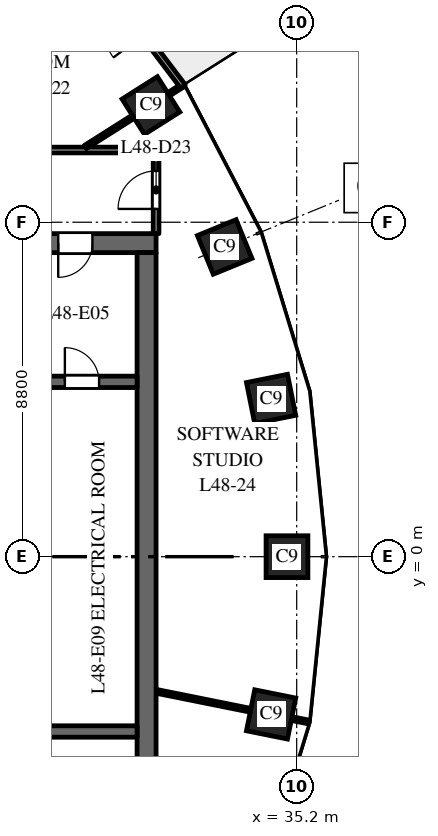
"""IFC4 building model, lengths in metres.
Left out: names, types, materials, properties, quantities, classifications, styles, units other than length and angle.
Written with IfcOpenShell. Run it as: python <this file> out.ifc"""

import sys

from ifc_helpers import new_model, si_unit, direction, frame, frame_2d, origin, origin_2d, place, context, subcontext, project, spatial, rectangle, extrude, element, fill, save


model = new_model("IFC4")
c1 = context("Model", 3, precision=1e-05, world=origin(), true_north=direction((0.0, 1.0)))
c2 = subcontext(c1, "Body", "Model", "MODEL_VIEW")
j1 = project(units=[si_unit("LENGTHUNIT", "METRE"), si_unit("PLANEANGLEUNIT", "RADIAN")], contexts=[c1])
p1 = place(None, origin())
s1 = spatial("IfcSite", under=j1, at=p1, CompositionType="ELEMENT")
p2 = place(p1, origin())
s2 = spatial("IfcBuilding", under=s1, at=p2, CompositionType="ELEMENT")
p3 = place(p2, frame((0.0, 0.0, 233.5)))
s3 = spatial("IfcBuildingStorey", under=s2, at=p3, CompositionType="ELEMENT", Elevation=233.5)
for number, where, z_axis, x_axis in (
    (1, (34.945, 0.0, 0.0), (0.0, 0.0, 1.0), (0.0, 1.0, 0.0)),
    (2, (34.527, 4.151, 0.0), (0.0, 0.0, 1.0), (-0.197, 0.98, 0.0)),
    (3, (33.305, 8.149, 0.0), (0.0, 0.0, 1.0), (-0.379, 0.925, 0.0)),
    (4, (31.365, 11.871, 0.0), (0.0, 0.0, 1.0), (-0.535, 0.845, 0.0)),
    (5, (34.527, -4.151, 0.0), (0.0, 0.0, 1.0), (0.197, 0.98, 0.0)),
):
    element("IfcColumn", number, at=place(p3, frame(where, z_axis=z_axis, x_axis=x_axis)), inside=s3, PredefinedType="COLUMN", context=c2, shape_type="SweptSolid", body=[
        extrude(rectangle(XDim=1.1, YDim=1.1, at=origin_2d()), origin(), (0.0, 0.0, 1.0), 4.0),
    ])
p4 = place(p3, frame((16.5, 8.25, 0.0), z_axis=(0.0, 0.0, 1.0), x_axis=(1.0, 0.0, 0.0)))
e6 = element("IfcWall", 6, at=p4, inside=s3, PredefinedType="SHEAR", context=c2, shape_type="SweptSolid", body=[
    extrude(rectangle(XDim=15.0, YDim=0.5, at=frame_2d((7.5, 0.0))), origin(), (0.0, 0.0, 1.0), 3.7),
])
p5 = place(p4, frame((6.9, 0.0, 0.0)))
e7 = element("IfcOpeningElement", 7, at=p5, cuts=e6, PredefinedType="OPENING", context=c2, shape_type="SweptSolid", body=[
    extrude(rectangle(XDim=1.2, YDim=2.1, at=frame_2d((0.6, 1.05))), frame((0.0, 0.26, 0.0), z_axis=(0.0, -1.0, 0.0), x_axis=(1.0, 0.0, 0.0)), (0.0, 0.0, 1.0), 0.52),
])
p6 = place(p4, frame((12.425, 0.0, 0.0)))
e8 = element("IfcOpeningElement", 8, at=p6, cuts=e6, PredefinedType="OPENING", context=c2, shape_type="SweptSolid", body=[
    extrude(rectangle(XDim=0.9, YDim=2.1, at=frame_2d((0.45, 1.05))), frame((0.0, 0.26, 0.0), z_axis=(0.0, -1.0, 0.0), x_axis=(1.0, 0.0, 0.0)), (0.0, 0.0, 1.0), 0.52),
])
p7 = place(p3, frame((31.25, -8.0, 0.0), z_axis=(0.0, 0.0, 1.0), x_axis=(0.0, 1.0, 0.0)))
e9 = element("IfcWall", 9, at=p7, inside=s3, PredefinedType="SHEAR", context=c2, shape_type="SweptSolid", body=[
    extrude(rectangle(XDim=16.0, YDim=0.5, at=frame_2d((8.0, 0.0))), origin(), (0.0, 0.0, 1.0), 3.7),
])
p8 = place(p3, frame((24.9, 4.6, 0.0), z_axis=(0.0, 0.0, 1.0), x_axis=(1.0, 0.0, 0.0)))
e10 = element("IfcWall", 10, at=p8, inside=s3, PredefinedType="SHEAR", context=c2, shape_type="SweptSolid", body=[
    extrude(rectangle(XDim=6.1, YDim=0.3, at=frame_2d((3.05, 0.0))), origin(), (0.0, 0.0, 1.0), 3.7),
])
p9 = place(p8, frame((4.2, 0.0, 0.0)))
e11 = element("IfcOpeningElement", 11, at=p9, cuts=e10, PredefinedType="OPENING", context=c2, shape_type="SweptSolid", body=[
    extrude(rectangle(XDim=0.9, YDim=2.1, at=frame_2d((0.45, 1.05))), frame((0.0, 0.16, 0.0), z_axis=(0.0, -1.0, 0.0), x_axis=(1.0, 0.0, 0.0)), (0.0, 0.0, 1.0), 0.32),
])
p10 = place(p3, frame((24.9, -4.6, 0.0), z_axis=(0.0, 0.0, 1.0), x_axis=(1.0, 0.0, 0.0)))
e12 = element("IfcWall", 12, at=p10, inside=s3, PredefinedType="SHEAR", context=c2, shape_type="SweptSolid", body=[
    extrude(rectangle(XDim=6.1, YDim=0.3, at=frame_2d((3.05, 0.0))), origin(), (0.0, 0.0, 1.0), 3.7),
])
p11 = place(p3, frame((32.208, 12.374, 0.0), z_axis=(0.0, 0.0, 1.0), x_axis=(-0.604045763106, 0.796949632081, 0.0)))
e13 = element("IfcWall", 13, at=p11, inside=s3, PredefinedType="STANDARD", context=c2, shape_type="SweptSolid", body=[
    extrude(rectangle(XDim=4.423, YDim=0.15, at=frame_2d((2.212, 0.0))), origin(), (0.0, 0.0, 1.0), 3.7),
])
p12 = place(p11, frame((1.712, 0.0, 0.0)))
e14 = element("IfcOpeningElement", 14, at=p12, cuts=e13, PredefinedType="OPENING", context=c2, shape_type="SweptSolid", body=[
    extrude(rectangle(XDim=1.0, YDim=2.4, at=frame_2d((0.5, 1.2))), frame((0.0, 0.085, 0.0), z_axis=(0.0, -1.0, 0.0), x_axis=(1.0, 0.0, 0.0)), (0.0, 0.0, 1.0), 0.17),
])
p13 = place(p3, frame((24.0, 10.7, 0.0), z_axis=(0.0, 0.0, 1.0), x_axis=(1.0, 0.0, 0.0)))
e15 = element("IfcWall", 15, at=p13, inside=s3, PredefinedType="PARTITIONING", context=c2, shape_type="SweptSolid", body=[
    extrude(rectangle(XDim=7.5, YDim=0.15, at=frame_2d((3.75, 0.0))), origin(), (0.0, 0.0, 1.0), 3.0),
])
p14 = place(p13, frame((2.371, 0.0, 0.0)))
e16 = element("IfcOpeningElement", 16, at=p14, cuts=e15, PredefinedType="OPENING", context=c2, shape_type="SweptSolid", body=[
    extrude(rectangle(XDim=1.0, YDim=2.1, at=frame_2d((0.5, 1.05))), frame((0.0, 0.085, 0.0), z_axis=(0.0, -1.0, 0.0), x_axis=(1.0, 0.0, 0.0)), (0.0, 0.0, 1.0), 0.17),
])
p15 = place(p3, frame((29.637, 10.777, 0.0), z_axis=(0.0, 0.0, 1.0), x_axis=(0.844810627195, 0.535065420467, 0.0)))
e17 = element("IfcWall", 17, at=p15, inside=s3, PredefinedType="PARTITIONING", context=c2, shape_type="SweptSolid", body=[
    extrude(rectangle(XDim=3.048, YDim=0.1, at=frame_2d((1.524, 0.0))), origin(), (0.0, 0.0, 1.0), 3.0),
])
p16 = place(p3, frame((31.5, -3.542, 0.0), z_axis=(0.0, 0.0, 1.0), x_axis=(0.980357474535, -0.197228857227, 0.0)))
e18 = element("IfcWall", 18, at=p16, inside=s3, PredefinedType="PARTITIONING", context=c2, shape_type="SweptSolid", body=[
    extrude(rectangle(XDim=4.092, YDim=0.1, at=frame_2d((2.046, 0.0))), origin(), (0.0, 0.0, 1.0), 3.0),
])
p17 = place(p3, frame((31.5, 8.5, 0.0), z_axis=(0.0, 0.0, 1.0), x_axis=(0.0, 1.0, 0.0)))
e19 = element("IfcWall", 19, at=p17, inside=s3, PredefinedType="PARTITIONING", context=c2, shape_type="SweptSolid", body=[
    extrude(rectangle(XDim=2.2, YDim=0.15, at=frame_2d((1.1, 0.0))), origin(), (0.0, 0.0, 1.0), 3.0),
])
p18 = place(p17, frame((0.65, 0.0, 0.0)))
e20 = element("IfcOpeningElement", 20, at=p18, cuts=e19, PredefinedType="OPENING", context=c2, shape_type="SweptSolid", body=[
    extrude(rectangle(XDim=1.0, YDim=2.1, at=frame_2d((0.5, 1.05))), frame((0.0, 0.085, 0.0), z_axis=(0.0, -1.0, 0.0), x_axis=(1.0, 0.0, 0.0)), (0.0, 0.0, 1.0), 0.17),
])
p19 = place(p6, origin())
e21 = element("IfcDoor", 21, at=p19, inside=s3, OperationType="SINGLE_SWING_LEFT", PredefinedType="DOOR", context=c2, shape_type="SweptSolid", body=[
    extrude(rectangle(XDim=0.9, YDim=2.1, at=frame_2d((0.45, 1.05))), frame((0.0, 0.025, 0.0), z_axis=(0.0, -1.0, 0.0), x_axis=(1.0, 0.0, 0.0)), (0.0, 0.0, 1.0), 0.05),
])
fill(e8, e21)
p20 = place(p9, origin())
e22 = element("IfcDoor", 22, at=p20, inside=s3, OperationType="SINGLE_SWING_RIGHT", PredefinedType="DOOR", context=c2, shape_type="SweptSolid", body=[
    extrude(rectangle(XDim=0.9, YDim=2.1, at=frame_2d((0.45, 1.05))), frame((0.0, 0.025, 0.0), z_axis=(0.0, -1.0, 0.0), x_axis=(1.0, 0.0, 0.0)), (0.0, 0.0, 1.0), 0.05),
])
fill(e11, e22)
p21 = place(p18, origin())
e23 = element("IfcDoor", 23, at=p21, inside=s3, OperationType="SINGLE_SWING_LEFT", PredefinedType="DOOR", context=c2, shape_type="SweptSolid", body=[
    extrude(rectangle(XDim=1.0, YDim=2.1, at=frame_2d((0.5, 1.05))), frame((0.0, 0.025, 0.0), z_axis=(0.0, -1.0, 0.0), x_axis=(1.0, 0.0, 0.0)), (0.0, 0.0, 1.0), 0.05),
])
fill(e20, e23)
save(model, sys.argv[1])
